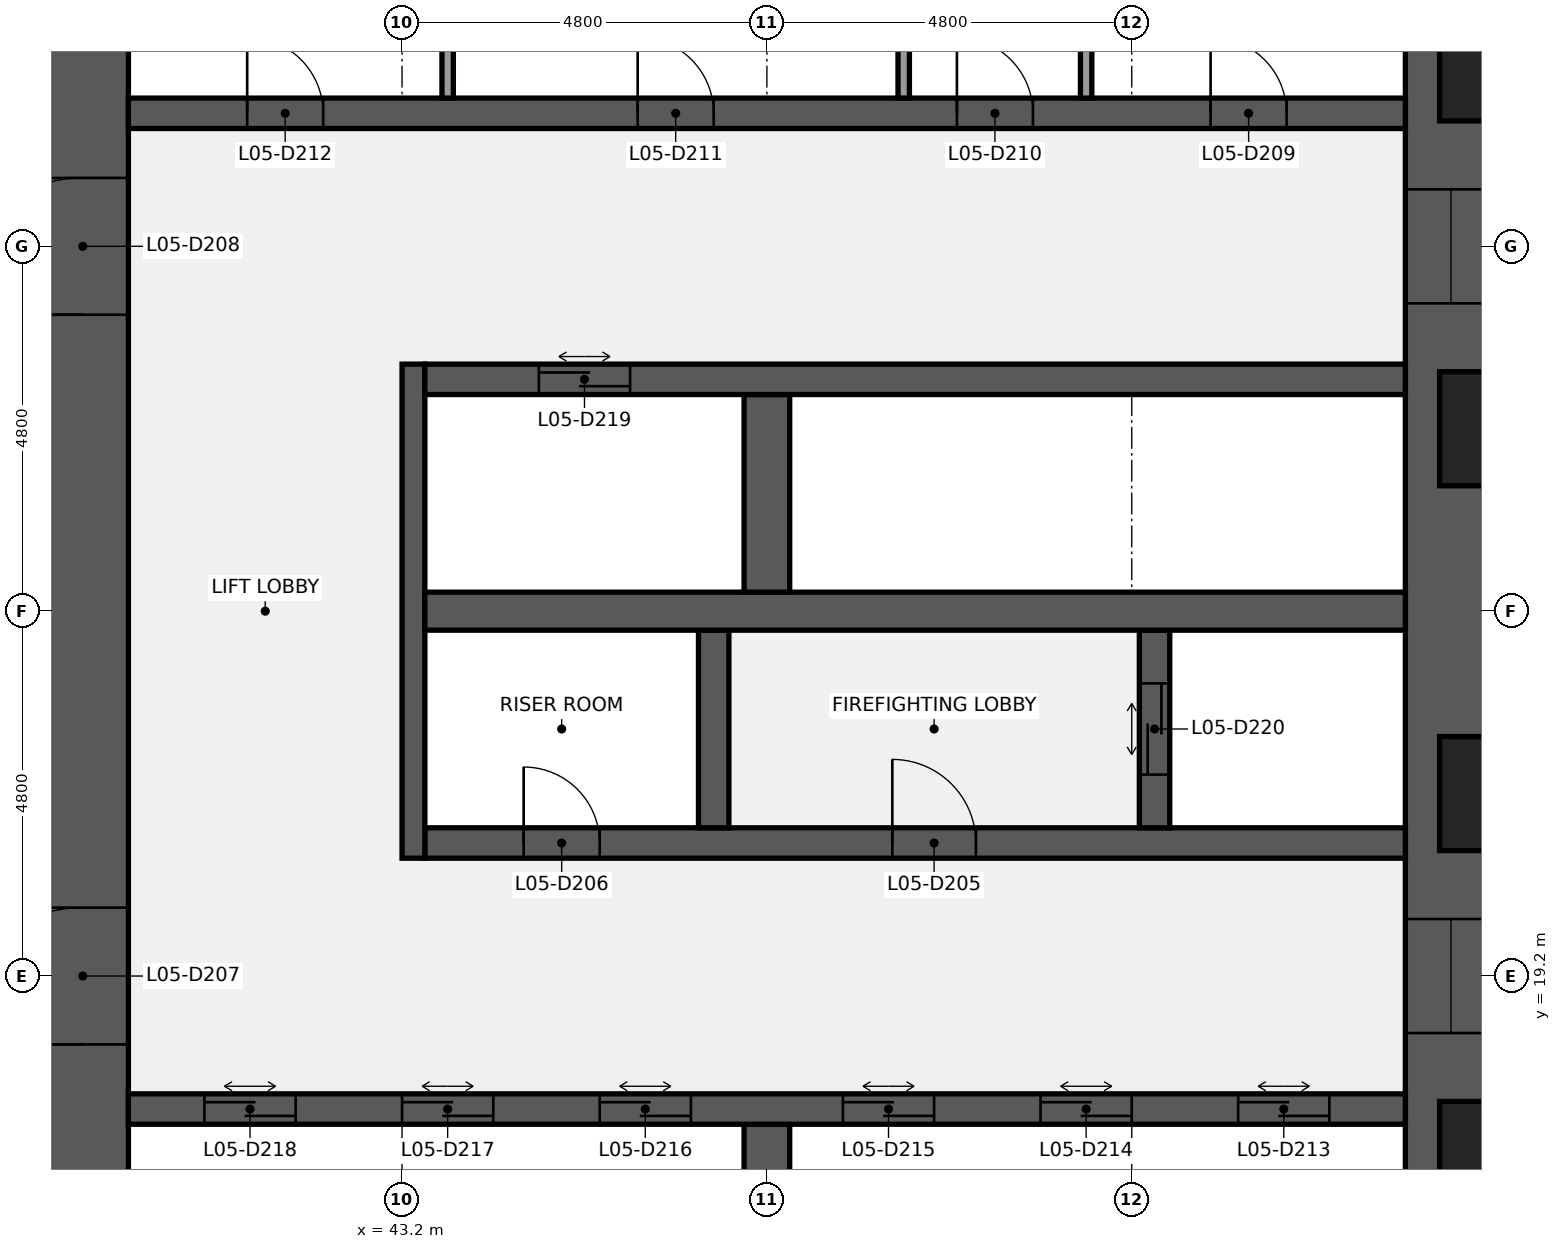
"""IFC4 building model, lengths in metres.
Left out: names, types, materials, properties, quantities, classifications, styles, units other than length and angle.
Written with IfcOpenShell. Run it as: python <this file> out.ifc"""

import sys

from ifc_helpers import new_model, si_unit, direction, frame, frame_2d, origin, place, context, subcontext, project, spatial, rectangle, extrude, element, fill, save


model = new_model("IFC4")
c1 = context("Model", 3, precision=1e-05, world=origin(), true_north=direction((0.0, 1.0)))
c2 = subcontext(c1, "Body", "Model", "MODEL_VIEW")
j1 = project(units=[si_unit("LENGTHUNIT", "METRE"), si_unit("PLANEANGLEUNIT", "RADIAN")], contexts=[c1])
p1 = place(None, origin())
s1 = spatial("IfcSite", under=j1, at=p1, CompositionType="ELEMENT")
p2 = place(p1, origin())
s2 = spatial("IfcBuilding", under=s1, at=p2, CompositionType="ELEMENT")
p3 = place(p2, frame((0.0, 0.0, 30.2)))
s3 = spatial("IfcBuildingStorey", under=s2, at=p3, CompositionType="ELEMENT", Elevation=30.2)
p4 = place(p3, frame((57.0, 38.4, 0.0), z_axis=(0.0, 0.0, 1.0), x_axis=(0.0, -1.0, 0.0)))
e1 = element("IfcWall", 1, at=p4, inside=s3, PredefinedType="SHEAR", context=c2, shape_type="SweptSolid", body=[
    extrude(rectangle(XDim=28.8, YDim=1.2, at=frame_2d((14.4, 0.0))), origin(), (0.0, 0.0, 1.0), 4.24),
])
p5 = place(p4, frame((18.45, 0.0, 0.9)))
e2 = element("IfcOpeningElement", 2, at=p5, cuts=e1, PredefinedType="OPENING", context=c2, shape_type="SweptSolid", body=[
    extrude(rectangle(XDim=1.5, YDim=1.5, at=frame_2d((0.75, 0.75))), frame((0.0, 0.61, 0.0), z_axis=(0.0, -1.0, 0.0), x_axis=(1.0, 0.0, 0.0)), (0.0, 0.0, 1.0), 1.22),
])
p6 = place(p4, frame((8.85, 0.0, 0.9)))
e3 = element("IfcOpeningElement", 3, at=p6, cuts=e1, PredefinedType="OPENING", context=c2, shape_type="SweptSolid", body=[
    extrude(rectangle(XDim=1.5, YDim=1.5, at=frame_2d((0.75, 0.75))), frame((0.0, 0.61, 0.0), z_axis=(0.0, -1.0, 0.0), x_axis=(1.0, 0.0, 0.0)), (0.0, 0.0, 1.0), 1.22),
])
p7 = place(p3, frame((39.0, 9.6, 0.0), z_axis=(0.0, 0.0, 1.0), x_axis=(0.0, 1.0, 0.0)))
e4 = element("IfcWall", 4, at=p7, inside=s3, PredefinedType="SHEAR", context=c2, shape_type="SweptSolid", body=[
    extrude(rectangle(XDim=28.8, YDim=1.2, at=frame_2d((14.4, 0.0))), origin(), (0.0, 0.0, 1.0), 4.24),
])
p8 = place(p7, frame((8.7, 0.0, 0.0)))
e5 = element("IfcOpeningElement", 5, at=p8, cuts=e4, PredefinedType="OPENING", context=c2, shape_type="SweptSolid", body=[
    extrude(rectangle(XDim=1.8, YDim=2.1, at=frame_2d((0.9, 1.05))), frame((0.0, 0.61, 0.0), z_axis=(0.0, -1.0, 0.0), x_axis=(1.0, 0.0, 0.0)), (0.0, 0.0, 1.0), 1.22),
])
p9 = place(p7, frame((18.3, 0.0, 0.0)))
e6 = element("IfcOpeningElement", 6, at=p9, cuts=e4, PredefinedType="OPENING", context=c2, shape_type="SweptSolid", body=[
    extrude(rectangle(XDim=1.8, YDim=2.1, at=frame_2d((0.9, 1.05))), frame((0.0, 0.61, 0.0), z_axis=(0.0, -1.0, 0.0), x_axis=(1.0, 0.0, 0.0)), (0.0, 0.0, 1.0), 1.22),
])
p10 = place(p3, frame((48.0, 14.65, 0.0), z_axis=(0.0, 0.0, 1.0), x_axis=(0.0, 1.0, 0.0)))
e7 = element("IfcWall", 7, at=p10, inside=s3, PredefinedType="SHEAR", context=c2, shape_type="SweptSolid", body=[
    extrude(rectangle(XDim=2.6, YDim=0.6, at=frame_2d((1.3, 0.0))), origin(), (0.0, 0.0, 1.0), 4.24),
])
p11 = place(p3, frame((39.6, 17.45, 0.0), z_axis=(0.0, 0.0, 1.0), x_axis=(1.0, 0.0, 0.0)))
e8 = element("IfcWall", 8, at=p11, inside=s3, PredefinedType="SHEAR", context=c2, shape_type="SweptSolid", body=[
    extrude(rectangle(XDim=16.8, YDim=0.4, at=frame_2d((8.4, 0.0))), origin(), (0.0, 0.0, 1.0), 4.24),
])
p12 = place(p11, frame((14.6, 0.0, 0.0)))
e9 = element("IfcOpeningElement", 9, at=p12, cuts=e8, PredefinedType="OPENING", context=c2, shape_type="SweptSolid", body=[
    extrude(rectangle(XDim=1.2, YDim=2.1, at=frame_2d((0.6, 1.05))), frame((0.0, 0.21, 0.0), z_axis=(0.0, -1.0, 0.0), x_axis=(1.0, 0.0, 0.0)), (0.0, 0.0, 1.0), 0.42),
])
p13 = place(p11, frame((12.0, 0.0, 0.0)))
e10 = element("IfcOpeningElement", 10, at=p13, cuts=e8, PredefinedType="OPENING", context=c2, shape_type="SweptSolid", body=[
    extrude(rectangle(XDim=1.2, YDim=2.1, at=frame_2d((0.6, 1.05))), frame((0.0, 0.21, 0.0), z_axis=(0.0, -1.0, 0.0), x_axis=(1.0, 0.0, 0.0)), (0.0, 0.0, 1.0), 0.42),
])
p14 = place(p11, frame((9.4, 0.0, 0.0)))
e11 = element("IfcOpeningElement", 11, at=p14, cuts=e8, PredefinedType="OPENING", context=c2, shape_type="SweptSolid", body=[
    extrude(rectangle(XDim=1.2, YDim=2.1, at=frame_2d((0.6, 1.05))), frame((0.0, 0.21, 0.0), z_axis=(0.0, -1.0, 0.0), x_axis=(1.0, 0.0, 0.0)), (0.0, 0.0, 1.0), 0.42),
])
p15 = place(p11, frame((6.2, 0.0, 0.0)))
e12 = element("IfcOpeningElement", 12, at=p15, cuts=e8, PredefinedType="OPENING", context=c2, shape_type="SweptSolid", body=[
    extrude(rectangle(XDim=1.2, YDim=2.1, at=frame_2d((0.6, 1.05))), frame((0.0, 0.21, 0.0), z_axis=(0.0, -1.0, 0.0), x_axis=(1.0, 0.0, 0.0)), (0.0, 0.0, 1.0), 0.42),
])
p16 = place(p11, frame((3.6, 0.0, 0.0)))
e13 = element("IfcOpeningElement", 13, at=p16, cuts=e8, PredefinedType="OPENING", context=c2, shape_type="SweptSolid", body=[
    extrude(rectangle(XDim=1.2, YDim=2.1, at=frame_2d((0.6, 1.05))), frame((0.0, 0.21, 0.0), z_axis=(0.0, -1.0, 0.0), x_axis=(1.0, 0.0, 0.0)), (0.0, 0.0, 1.0), 0.42),
])
p17 = place(p11, frame((1.0, 0.0, 0.0)))
e14 = element("IfcOpeningElement", 14, at=p17, cuts=e8, PredefinedType="OPENING", context=c2, shape_type="SweptSolid", body=[
    extrude(rectangle(XDim=1.2, YDim=2.1, at=frame_2d((0.6, 1.05))), frame((0.0, 0.21, 0.0), z_axis=(0.0, -1.0, 0.0), x_axis=(1.0, 0.0, 0.0)), (0.0, 0.0, 1.0), 0.42),
])
p18 = place(p3, frame((43.5, 20.95, 0.0), z_axis=(0.0, 0.0, 1.0), x_axis=(1.0, 0.0, 0.0)))
e15 = element("IfcWall", 15, at=p18, inside=s3, PredefinedType="SHEAR", context=c2, shape_type="SweptSolid", body=[
    extrude(rectangle(XDim=12.9, YDim=0.4, at=frame_2d((6.45, 0.0))), origin(), (0.0, 0.0, 1.0), 4.24),
])
p19 = place(p18, frame((6.15, 0.0, 0.0)))
e16 = element("IfcOpeningElement", 16, at=p19, cuts=e15, PredefinedType="OPENING", context=c2, shape_type="SweptSolid", body=[
    extrude(rectangle(XDim=1.1, YDim=2.1, at=frame_2d((0.55, 1.05))), frame((0.0, 0.21, 0.0), z_axis=(0.0, -1.0, 0.0), x_axis=(1.0, 0.0, 0.0)), (0.0, 0.0, 1.0), 0.42),
])
p20 = place(p18, frame((1.3, 0.0, 0.0)))
e17 = element("IfcOpeningElement", 17, at=p20, cuts=e15, PredefinedType="OPENING", context=c2, shape_type="SweptSolid", body=[
    extrude(rectangle(XDim=1.0, YDim=2.1, at=frame_2d((0.5, 1.05))), frame((0.0, 0.21, 0.0), z_axis=(0.0, -1.0, 0.0), x_axis=(1.0, 0.0, 0.0)), (0.0, 0.0, 1.0), 0.42),
])
p21 = place(p3, frame((43.35, 20.75, 0.0), z_axis=(0.0, 0.0, 1.0), x_axis=(0.0, 1.0, 0.0)))
e18 = element("IfcWall", 18, at=p21, inside=s3, PredefinedType="SHEAR", context=c2, shape_type="SweptSolid", body=[
    extrude(rectangle(XDim=6.5, YDim=0.3, at=frame_2d((3.25, 0.0))), origin(), (0.0, 0.0, 1.0), 4.24),
])
p22 = place(p3, frame((53.1, 21.15, 0.0), z_axis=(0.0, 0.0, 1.0), x_axis=(0.0, 1.0, 0.0)))
e19 = element("IfcWall", 19, at=p22, inside=s3, PredefinedType="SHEAR", context=c2, shape_type="SweptSolid", body=[
    extrude(rectangle(XDim=2.6, YDim=0.4, at=frame_2d((1.3, 0.0))), origin(), (0.0, 0.0, 1.0), 4.24),
])
p23 = place(p22, frame((0.7, 0.0, 0.0)))
e20 = element("IfcOpeningElement", 20, at=p23, cuts=e19, PredefinedType="OPENING", context=c2, shape_type="SweptSolid", body=[
    extrude(rectangle(XDim=1.2, YDim=2.1, at=frame_2d((0.6, 1.05))), frame((0.0, 0.21, 0.0), z_axis=(0.0, -1.0, 0.0), x_axis=(1.0, 0.0, 0.0)), (0.0, 0.0, 1.0), 0.42),
])
p24 = place(p3, frame((47.3, 21.15, 0.0), z_axis=(0.0, 0.0, 1.0), x_axis=(0.0, 1.0, 0.0)))
e21 = element("IfcWall", 21, at=p24, inside=s3, PredefinedType="SHEAR", context=c2, shape_type="SweptSolid", body=[
    extrude(rectangle(XDim=2.6, YDim=0.4, at=frame_2d((1.3, 0.0))), origin(), (0.0, 0.0, 1.0), 4.24),
])
p25 = place(p3, frame((43.5, 24.0, 0.0), z_axis=(0.0, 0.0, 1.0), x_axis=(1.0, 0.0, 0.0)))
e22 = element("IfcWall", 22, at=p25, inside=s3, PredefinedType="SHEAR", context=c2, shape_type="SweptSolid", body=[
    extrude(rectangle(XDim=12.9, YDim=0.5, at=frame_2d((6.45, 0.0))), origin(), (0.0, 0.0, 1.0), 4.24),
])
p26 = place(p3, frame((48.0, 24.25, 0.0), z_axis=(0.0, 0.0, 1.0), x_axis=(0.0, 1.0, 0.0)))
e23 = element("IfcWall", 23, at=p26, inside=s3, PredefinedType="SHEAR", context=c2, shape_type="SweptSolid", body=[
    extrude(rectangle(XDim=2.6, YDim=0.6, at=frame_2d((1.3, 0.0))), origin(), (0.0, 0.0, 1.0), 4.24),
])
p27 = place(p3, frame((43.5, 27.05, 0.0), z_axis=(0.0, 0.0, 1.0), x_axis=(1.0, 0.0, 0.0)))
e24 = element("IfcWall", 24, at=p27, inside=s3, PredefinedType="SHEAR", context=c2, shape_type="SweptSolid", body=[
    extrude(rectangle(XDim=12.9, YDim=0.4, at=frame_2d((6.45, 0.0))), origin(), (0.0, 0.0, 1.0), 4.24),
])
p28 = place(p27, frame((1.5, 0.0, 0.0)))
e25 = element("IfcOpeningElement", 25, at=p28, cuts=e24, PredefinedType="OPENING", context=c2, shape_type="SweptSolid", body=[
    extrude(rectangle(XDim=1.2, YDim=2.1, at=frame_2d((0.6, 1.05))), frame((0.0, 0.21, 0.0), z_axis=(0.0, -1.0, 0.0), x_axis=(1.0, 0.0, 0.0)), (0.0, 0.0, 1.0), 0.42),
])
p29 = place(p3, frame((39.6, 30.55, 0.0), z_axis=(0.0, 0.0, 1.0), x_axis=(1.0, 0.0, 0.0)))
e26 = element("IfcWall", 26, at=p29, inside=s3, PredefinedType="SHEAR", context=c2, shape_type="SweptSolid", body=[
    extrude(rectangle(XDim=16.8, YDim=0.4, at=frame_2d((8.4, 0.0))), origin(), (0.0, 0.0, 1.0), 4.24),
])
p30 = place(p29, frame((14.238, 0.0, 0.0)))
e27 = element("IfcOpeningElement", 27, at=p30, cuts=e26, PredefinedType="OPENING", context=c2, shape_type="SweptSolid", body=[
    extrude(rectangle(XDim=1.0, YDim=2.1, at=frame_2d((0.5, 1.05))), frame((0.0, 0.21, 0.0), z_axis=(0.0, -1.0, 0.0), x_axis=(1.0, 0.0, 0.0)), (0.0, 0.0, 1.0), 0.42),
])
p31 = place(p29, frame((10.9, 0.0, 0.0)))
e28 = element("IfcOpeningElement", 28, at=p31, cuts=e26, PredefinedType="OPENING", context=c2, shape_type="SweptSolid", body=[
    extrude(rectangle(XDim=1.0, YDim=2.1, at=frame_2d((0.5, 1.05))), frame((0.0, 0.21, 0.0), z_axis=(0.0, -1.0, 0.0), x_axis=(1.0, 0.0, 0.0)), (0.0, 0.0, 1.0), 0.42),
])
p32 = place(p29, frame((6.7, 0.0, 0.0)))
e29 = element("IfcOpeningElement", 29, at=p32, cuts=e26, PredefinedType="OPENING", context=c2, shape_type="SweptSolid", body=[
    extrude(rectangle(XDim=1.0, YDim=2.1, at=frame_2d((0.5, 1.05))), frame((0.0, 0.21, 0.0), z_axis=(0.0, -1.0, 0.0), x_axis=(1.0, 0.0, 0.0)), (0.0, 0.0, 1.0), 0.42),
])
p33 = place(p29, frame((1.562, 0.0, 0.0)))
e30 = element("IfcOpeningElement", 30, at=p33, cuts=e26, PredefinedType="OPENING", context=c2, shape_type="SweptSolid", body=[
    extrude(rectangle(XDim=1.0, YDim=2.1, at=frame_2d((0.5, 1.05))), frame((0.0, 0.21, 0.0), z_axis=(0.0, -1.0, 0.0), x_axis=(1.0, 0.0, 0.0)), (0.0, 0.0, 1.0), 0.42),
])
for number, where, z_axis, x_axis in (
    (31, (52.2, 30.75, 0.0), (0.0, 0.0, 1.0), (0.0, 1.0, 0.0)),
    (32, (49.8, 30.75, 0.0), (0.0, 0.0, 1.0), (0.0, 1.0, 0.0)),
    (33, (43.8, 30.75, 0.0), (0.0, 0.0, 1.0), (0.0, 1.0, 0.0)),
):
    element("IfcWall", number, at=place(p3, frame(where, z_axis=z_axis, x_axis=x_axis)), inside=s3, PredefinedType="PARTITIONING", context=c2, shape_type="SweptSolid", body=[
        extrude(rectangle(XDim=2.6, YDim=0.15, at=frame_2d((1.3, 0.0))), origin(), (0.0, 0.0, 1.0), 4.24),
    ])
p34 = place(p19, origin())
e34 = element("IfcDoor", 34, at=p34, inside=s3, OperationType="SINGLE_SWING_LEFT", PredefinedType="DOOR", context=c2, shape_type="SweptSolid", body=[
    extrude(rectangle(XDim=1.1, YDim=2.1, at=frame_2d((0.55, 1.05))), frame((0.0, 0.025, 0.0), z_axis=(0.0, -1.0, 0.0), x_axis=(1.0, 0.0, 0.0)), (0.0, 0.0, 1.0), 0.05),
])
fill(e16, e34)
p35 = place(p20, origin())
e35 = element("IfcDoor", 35, at=p35, inside=s3, OperationType="SINGLE_SWING_LEFT", PredefinedType="DOOR", context=c2, shape_type="SweptSolid", body=[
    extrude(rectangle(XDim=1.0, YDim=2.1, at=frame_2d((0.5, 1.05))), frame((0.0, 0.025, 0.0), z_axis=(0.0, -1.0, 0.0), x_axis=(1.0, 0.0, 0.0)), (0.0, 0.0, 1.0), 0.05),
])
fill(e17, e35)
p36 = place(p8, origin())
e36 = element("IfcDoor", 36, at=p36, inside=s3, OperationType="DOUBLE_DOOR_SINGLE_SWING", PredefinedType="DOOR", context=c2, shape_type="SweptSolid", body=[
    extrude(rectangle(XDim=1.8, YDim=2.1, at=frame_2d((0.9, 1.05))), frame((0.0, 0.025, 0.0), z_axis=(0.0, -1.0, 0.0), x_axis=(1.0, 0.0, 0.0)), (0.0, 0.0, 1.0), 0.05),
])
fill(e5, e36)
p37 = place(p9, origin())
e37 = element("IfcDoor", 37, at=p37, inside=s3, OperationType="DOUBLE_DOOR_SINGLE_SWING", PredefinedType="DOOR", context=c2, shape_type="SweptSolid", body=[
    extrude(rectangle(XDim=1.8, YDim=2.1, at=frame_2d((0.9, 1.05))), frame((0.0, 0.025, 0.0), z_axis=(0.0, -1.0, 0.0), x_axis=(1.0, 0.0, 0.0)), (0.0, 0.0, 1.0), 0.05),
])
fill(e6, e37)
p38 = place(p30, origin())
e38 = element("IfcDoor", 38, at=p38, inside=s3, OperationType="SINGLE_SWING_LEFT", PredefinedType="DOOR", context=c2, shape_type="SweptSolid", body=[
    extrude(rectangle(XDim=1.0, YDim=2.1, at=frame_2d((0.5, 1.05))), frame((0.0, 0.025, 0.0), z_axis=(0.0, -1.0, 0.0), x_axis=(1.0, 0.0, 0.0)), (0.0, 0.0, 1.0), 0.05),
])
fill(e27, e38)
p39 = place(p31, origin())
e39 = element("IfcDoor", 39, at=p39, inside=s3, OperationType="SINGLE_SWING_LEFT", PredefinedType="DOOR", context=c2, shape_type="SweptSolid", body=[
    extrude(rectangle(XDim=1.0, YDim=2.1, at=frame_2d((0.5, 1.05))), frame((0.0, 0.025, 0.0), z_axis=(0.0, -1.0, 0.0), x_axis=(1.0, 0.0, 0.0)), (0.0, 0.0, 1.0), 0.05),
])
fill(e28, e39)
p40 = place(p32, origin())
e40 = element("IfcDoor", 40, at=p40, inside=s3, OperationType="SINGLE_SWING_LEFT", PredefinedType="DOOR", context=c2, shape_type="SweptSolid", body=[
    extrude(rectangle(XDim=1.0, YDim=2.1, at=frame_2d((0.5, 1.05))), frame((0.0, 0.025, 0.0), z_axis=(0.0, -1.0, 0.0), x_axis=(1.0, 0.0, 0.0)), (0.0, 0.0, 1.0), 0.05),
])
fill(e29, e40)
p41 = place(p33, origin())
e41 = element("IfcDoor", 41, at=p41, inside=s3, OperationType="SINGLE_SWING_LEFT", PredefinedType="DOOR", context=c2, shape_type="SweptSolid", body=[
    extrude(rectangle(XDim=1.0, YDim=2.1, at=frame_2d((0.5, 1.05))), frame((0.0, 0.025, 0.0), z_axis=(0.0, -1.0, 0.0), x_axis=(1.0, 0.0, 0.0)), (0.0, 0.0, 1.0), 0.05),
])
fill(e30, e41)
p42 = place(p12, origin())
e42 = element("IfcDoor", 42, at=p42, inside=s3, OperationType="DOUBLE_DOOR_SLIDING", PredefinedType="DOOR", context=c2, shape_type="SweptSolid", body=[
    extrude(rectangle(XDim=1.2, YDim=2.1, at=frame_2d((0.6, 1.05))), frame((0.0, 0.025, 0.0), z_axis=(0.0, -1.0, 0.0), x_axis=(1.0, 0.0, 0.0)), (0.0, 0.0, 1.0), 0.05),
])
fill(e9, e42)
p43 = place(p13, origin())
e43 = element("IfcDoor", 43, at=p43, inside=s3, OperationType="DOUBLE_DOOR_SLIDING", PredefinedType="DOOR", context=c2, shape_type="SweptSolid", body=[
    extrude(rectangle(XDim=1.2, YDim=2.1, at=frame_2d((0.6, 1.05))), frame((0.0, 0.025, 0.0), z_axis=(0.0, -1.0, 0.0), x_axis=(1.0, 0.0, 0.0)), (0.0, 0.0, 1.0), 0.05),
])
fill(e10, e43)
p44 = place(p14, origin())
e44 = element("IfcDoor", 44, at=p44, inside=s3, OperationType="DOUBLE_DOOR_SLIDING", PredefinedType="DOOR", context=c2, shape_type="SweptSolid", body=[
    extrude(rectangle(XDim=1.2, YDim=2.1, at=frame_2d((0.6, 1.05))), frame((0.0, 0.025, 0.0), z_axis=(0.0, -1.0, 0.0), x_axis=(1.0, 0.0, 0.0)), (0.0, 0.0, 1.0), 0.05),
])
fill(e11, e44)
p45 = place(p15, origin())
e45 = element("IfcDoor", 45, at=p45, inside=s3, OperationType="DOUBLE_DOOR_SLIDING", PredefinedType="DOOR", context=c2, shape_type="SweptSolid", body=[
    extrude(rectangle(XDim=1.2, YDim=2.1, at=frame_2d((0.6, 1.05))), frame((0.0, 0.025, 0.0), z_axis=(0.0, -1.0, 0.0), x_axis=(1.0, 0.0, 0.0)), (0.0, 0.0, 1.0), 0.05),
])
fill(e12, e45)
p46 = place(p16, origin())
e46 = element("IfcDoor", 46, at=p46, inside=s3, OperationType="DOUBLE_DOOR_SLIDING", PredefinedType="DOOR", context=c2, shape_type="SweptSolid", body=[
    extrude(rectangle(XDim=1.2, YDim=2.1, at=frame_2d((0.6, 1.05))), frame((0.0, 0.025, 0.0), z_axis=(0.0, -1.0, 0.0), x_axis=(1.0, 0.0, 0.0)), (0.0, 0.0, 1.0), 0.05),
])
fill(e13, e46)
p47 = place(p17, origin())
e47 = element("IfcDoor", 47, at=p47, inside=s3, OperationType="DOUBLE_DOOR_SLIDING", PredefinedType="DOOR", context=c2, shape_type="SweptSolid", body=[
    extrude(rectangle(XDim=1.2, YDim=2.1, at=frame_2d((0.6, 1.05))), frame((0.0, 0.025, 0.0), z_axis=(0.0, -1.0, 0.0), x_axis=(1.0, 0.0, 0.0)), (0.0, 0.0, 1.0), 0.05),
])
fill(e14, e47)
p48 = place(p28, origin())
e48 = element("IfcDoor", 48, at=p48, inside=s3, OperationType="DOUBLE_DOOR_SLIDING", PredefinedType="DOOR", context=c2, shape_type="SweptSolid", body=[
    extrude(rectangle(XDim=1.2, YDim=2.1, at=frame_2d((0.6, 1.05))), frame((0.0, 0.025, 0.0), z_axis=(0.0, -1.0, 0.0), x_axis=(1.0, 0.0, 0.0)), (0.0, 0.0, 1.0), 0.05),
])
fill(e25, e48)
p49 = place(p23, origin())
e49 = element("IfcDoor", 49, at=p49, inside=s3, OperationType="DOUBLE_DOOR_SLIDING", PredefinedType="DOOR", context=c2, shape_type="SweptSolid", body=[
    extrude(rectangle(XDim=1.2, YDim=2.1, at=frame_2d((0.6, 1.05))), frame((0.0, 0.025, 0.0), z_axis=(0.0, -1.0, 0.0), x_axis=(1.0, 0.0, 0.0)), (0.0, 0.0, 1.0), 0.05),
])
fill(e20, e49)
p50 = place(p5, origin())
e50 = element("IfcWindow", 50, at=p50, inside=s3, PartitioningType="SINGLE_PANEL", PredefinedType="WINDOW", context=c2, shape_type="SweptSolid", body=[
    extrude(rectangle(XDim=1.5, YDim=1.5, at=frame_2d((0.75, 0.75))), frame((0.0, 0.03, 0.0), z_axis=(0.0, -1.0, 0.0), x_axis=(1.0, 0.0, 0.0)), (0.0, 0.0, 1.0), 0.06),
])
fill(e2, e50)
p51 = place(p6, origin())
e51 = element("IfcWindow", 51, at=p51, inside=s3, PartitioningType="SINGLE_PANEL", PredefinedType="WINDOW", context=c2, shape_type="SweptSolid", body=[
    extrude(rectangle(XDim=1.5, YDim=1.5, at=frame_2d((0.75, 0.75))), frame((0.0, 0.03, 0.0), z_axis=(0.0, -1.0, 0.0), x_axis=(1.0, 0.0, 0.0)), (0.0, 0.0, 1.0), 0.06),
])
fill(e3, e51)
save(model, sys.argv[1])
